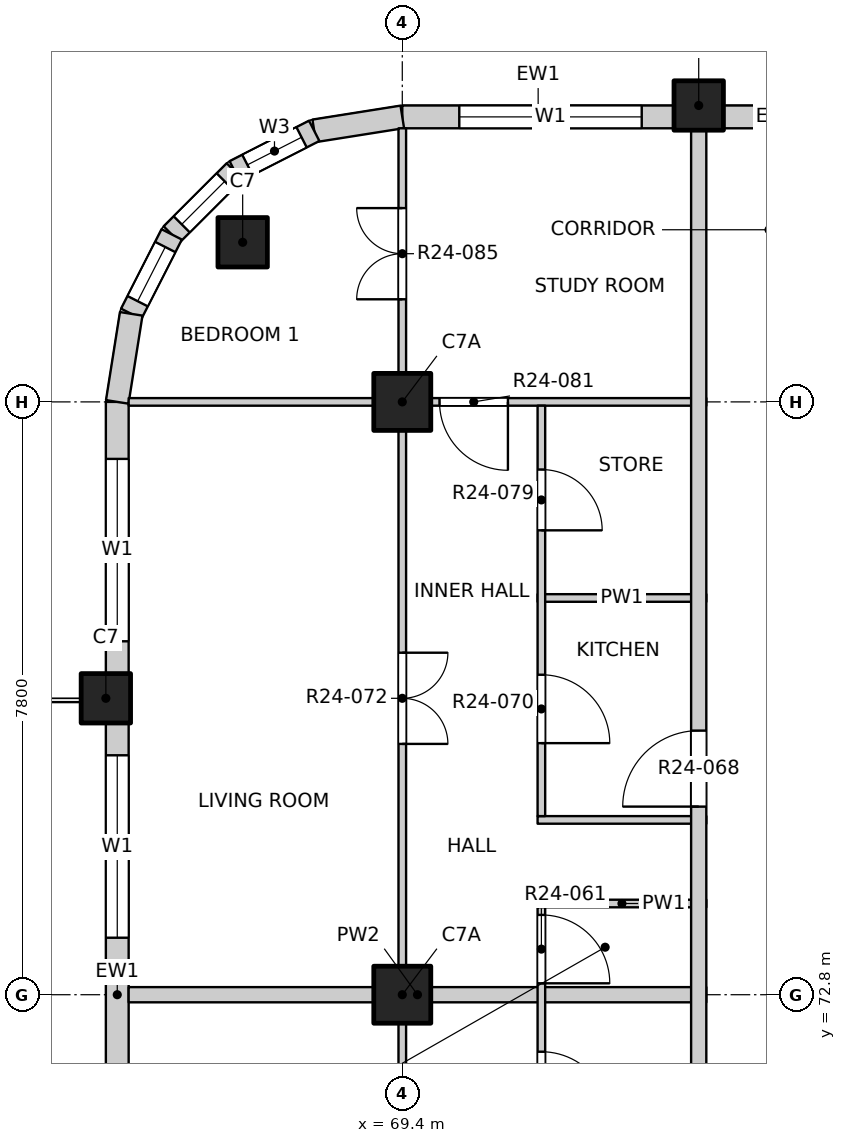
"""IFC4 building model, lengths in metres.
Left out: names, types, materials, properties, quantities, classifications, styles, units other than length and angle.
Written with IfcOpenShell. Run it as: python <this file> out.ifc"""

import sys

from ifc_helpers import new_model, si_unit, direction, frame, frame_2d, origin, origin_2d, place, context, subcontext, project, spatial, rectangle, extrude, element, fill, save


model = new_model("IFC4")
c1 = context("Model", 3, precision=1e-05, world=origin(), true_north=direction((0.0, 1.0)))
c2 = subcontext(c1, "Body", "Model", "MODEL_VIEW")
j1 = project(units=[si_unit("LENGTHUNIT", "METRE"), si_unit("PLANEANGLEUNIT", "RADIAN")], contexts=[c1])
p1 = place(None, origin())
s1 = spatial("IfcSite", under=j1, at=p1, CompositionType="ELEMENT")
p2 = place(p1, origin())
s2 = spatial("IfcBuilding", under=s1, at=p2, CompositionType="ELEMENT")
p3 = place(p2, frame((0.0, 0.0, 246.0)))
s3 = spatial("IfcBuildingStorey", under=s2, at=p3, CompositionType="ELEMENT", Elevation=246.0)
for number, where, z_axis, x_axis in (
    (1, (67.3, 82.7, -0.3), (0.0, 0.0, 1.0), (1.0, 0.0, 0.0)),
    (2, (73.3, 84.5, -0.3), (0.0, 0.0, 1.0), (1.0, 0.0, 0.0)),
    (3, (65.5, 76.7, -0.3), (0.0, 0.0, 1.0), (1.0, 0.0, 0.0)),
):
    element("IfcColumn", number, at=place(p3, frame(where, z_axis=z_axis, x_axis=x_axis)), inside=s3, PredefinedType="COLUMN", context=c2, shape_type="SweptSolid", body=[
        extrude(rectangle(XDim=0.65, YDim=0.65, at=origin_2d()), origin(), (0.0, 0.0, 1.0), 3.45),
    ])
for number, where, z_axis, x_axis in (
    (4, (69.4, 72.8, -0.3), (0.0, 0.0, 1.0), (1.0, 0.0, 0.0)),
    (5, (69.4, 80.6, -0.3), (0.0, 0.0, 1.0), (1.0, 0.0, 0.0)),
):
    element("IfcColumn", number, at=place(p3, frame(where, z_axis=z_axis, x_axis=x_axis)), inside=s3, PredefinedType="COLUMN", context=c2, shape_type="SweptSolid", body=[
        extrude(rectangle(XDim=0.75, YDim=0.75, at=origin_2d()), origin(), (0.0, 0.0, 1.0), 3.45),
    ])
p4 = place(p3, frame((69.4, 84.35, 0.0), z_axis=(0.0, 0.0, 1.0), x_axis=(1.0, 0.0, 0.0)))
e6 = element("IfcWall", 6, at=p4, inside=s3, PredefinedType="SOLIDWALL", context=c2, shape_type="SweptSolid", body=[
    extrude(rectangle(XDim=3.575, YDim=0.3, at=frame_2d((1.788, 0.0))), origin(), (0.0, 0.0, 1.0), 2.7),
])
p5 = place(p4, frame((0.75, 0.0, 0.9)))
e7 = element("IfcOpeningElement", 7, at=p5, cuts=e6, PredefinedType="OPENING", context=c2, shape_type="SweptSolid", body=[
    extrude(rectangle(XDim=2.4, YDim=1.8, at=frame_2d((1.2, 0.9))), frame((0.0, 0.16, 0.0), z_axis=(0.0, -1.0, 0.0), x_axis=(1.0, 0.0, 0.0)), (0.0, 0.0, 1.0), 0.32),
])
p6 = place(p3, frame((73.625, 84.35, 0.0), z_axis=(0.0, 0.0, 1.0), x_axis=(1.0, 0.0, 0.0)))
e8 = element("IfcWall", 8, at=p6, inside=s3, PredefinedType="SOLIDWALL", context=c2, shape_type="SweptSolid", body=[
    extrude(rectangle(XDim=1.425, YDim=0.3, at=frame_2d((0.712, 0.0))), origin(), (0.0, 0.0, 1.0), 2.7),
])
p7 = place(p3, frame((65.65, 69.225, 0.0), z_axis=(0.0, 0.0, 1.0), x_axis=(0.0, 1.0, 0.0)))
e9 = element("IfcWall", 9, at=p7, inside=s3, PredefinedType="SOLIDWALL", context=c2, shape_type="SweptSolid", body=[
    extrude(rectangle(XDim=7.15, YDim=0.3, at=frame_2d((3.575, 0.0))), origin(), (0.0, 0.0, 1.0), 2.7),
])
p8 = place(p7, frame((0.725, 0.0, 0.0)))
e10 = element("IfcOpeningElement", 10, at=p8, cuts=e9, PredefinedType="OPENING", context=c2, shape_type="SweptSolid", body=[
    extrude(rectangle(XDim=1.8, YDim=2.4, at=frame_2d((0.9, 1.2))), frame((0.0, 0.16, 0.0), z_axis=(0.0, -1.0, 0.0), x_axis=(1.0, 0.0, 0.0)), (0.0, 0.0, 1.0), 0.32),
])
p9 = place(p7, frame((4.325, 0.0, 0.9)))
e11 = element("IfcOpeningElement", 11, at=p9, cuts=e9, PredefinedType="OPENING", context=c2, shape_type="SweptSolid", body=[
    extrude(rectangle(XDim=2.4, YDim=1.8, at=frame_2d((1.2, 0.9))), frame((0.0, 0.16, 0.0), z_axis=(0.0, -1.0, 0.0), x_axis=(1.0, 0.0, 0.0)), (0.0, 0.0, 1.0), 0.32),
])
p10 = place(p3, frame((65.65, 77.025, 0.0), z_axis=(0.0, 0.0, 1.0), x_axis=(0.0, 1.0, 0.0)))
e12 = element("IfcWall", 12, at=p10, inside=s3, PredefinedType="SOLIDWALL", context=c2, shape_type="SweptSolid", body=[
    extrude(rectangle(XDim=3.575, YDim=0.3, at=frame_2d((1.788, 0.0))), origin(), (0.0, 0.0, 1.0), 2.7),
])
p11 = place(p10, frame((0.425, 0.0, 0.9)))
e13 = element("IfcOpeningElement", 13, at=p11, cuts=e12, PredefinedType="OPENING", context=c2, shape_type="SweptSolid", body=[
    extrude(rectangle(XDim=2.4, YDim=1.8, at=frame_2d((1.2, 0.9))), frame((0.0, 0.16, 0.0), z_axis=(0.0, -1.0, 0.0), x_axis=(1.0, 0.0, 0.0)), (0.0, 0.0, 1.0), 0.32),
])
p12 = place(p3, frame((69.4, 84.35, 0.0), z_axis=(0.0, 0.0, 1.0), x_axis=(-0.987678452879, -0.156496880861, 0.0)))
e14 = element("IfcWall", 14, at=p12, inside=s3, PredefinedType="SOLIDWALL", context=c2, shape_type="SweptSolid", body=[
    extrude(rectangle(XDim=1.173, YDim=0.3, at=frame_2d((0.586, 0.0))), origin(), (0.0, 0.0, 1.0), 2.7),
])
p13 = place(p3, frame((68.241, 84.167, 0.0), z_axis=(0.0, 0.0, 1.0), x_axis=(-0.890988677504, -0.454025524128, 0.0)))
e15 = element("IfcWall", 15, at=p13, inside=s3, PredefinedType="SOLIDWALL", context=c2, shape_type="SweptSolid", body=[
    extrude(rectangle(XDim=1.173, YDim=0.3, at=frame_2d((0.587, 0.0))), origin(), (0.0, 0.0, 1.0), 2.7),
])
p14 = place(p13, frame((0.187, 0.0, 0.9)))
e16 = element("IfcOpeningElement", 16, at=p14, cuts=e15, PredefinedType="OPENING", context=c2, shape_type="SweptSolid", body=[
    extrude(rectangle(XDim=0.8, YDim=1.2, at=frame_2d((0.4, 0.6))), frame((0.0, 0.16, 0.0), z_axis=(0.0, -1.0, 0.0), x_axis=(1.0, 0.0, 0.0)), (0.0, 0.0, 1.0), 0.32),
])
p15 = place(p3, frame((67.196, 83.634, 0.0), z_axis=(0.0, 0.0, 1.0), x_axis=(-0.707106781187, -0.707106781187, 0.0)))
e17 = element("IfcWall", 17, at=p15, inside=s3, PredefinedType="SOLIDWALL", context=c2, shape_type="SweptSolid", body=[
    extrude(rectangle(XDim=1.173, YDim=0.3, at=frame_2d((0.586, 0.0))), origin(), (0.0, 0.0, 1.0), 2.7),
])
p16 = place(p15, frame((0.187, 0.0, 0.9)))
e18 = element("IfcOpeningElement", 18, at=p16, cuts=e17, PredefinedType="OPENING", context=c2, shape_type="SweptSolid", body=[
    extrude(rectangle(XDim=0.8, YDim=1.2, at=frame_2d((0.4, 0.6))), frame((0.0, 0.16, 0.0), z_axis=(0.0, -1.0, 0.0), x_axis=(1.0, 0.0, 0.0)), (0.0, 0.0, 1.0), 0.32),
])
p17 = place(p3, frame((66.366, 82.804, 0.0), z_axis=(0.0, 0.0, 1.0), x_axis=(-0.454025524128, -0.890988677504, 0.0)))
e19 = element("IfcWall", 19, at=p17, inside=s3, PredefinedType="SOLIDWALL", context=c2, shape_type="SweptSolid", body=[
    extrude(rectangle(XDim=1.173, YDim=0.3, at=frame_2d((0.587, 0.0))), origin(), (0.0, 0.0, 1.0), 2.7),
])
p18 = place(p17, frame((0.187, 0.0, 0.9)))
e20 = element("IfcOpeningElement", 20, at=p18, cuts=e19, PredefinedType="OPENING", context=c2, shape_type="SweptSolid", body=[
    extrude(rectangle(XDim=0.8, YDim=1.2, at=frame_2d((0.4, 0.6))), frame((0.0, 0.16, 0.0), z_axis=(0.0, -1.0, 0.0), x_axis=(1.0, 0.0, 0.0)), (0.0, 0.0, 1.0), 0.32),
])
p19 = place(p3, frame((65.833, 81.759, 0.0), z_axis=(0.0, 0.0, 1.0), x_axis=(-0.156496880861, -0.987678452879, 0.0)))
e21 = element("IfcWall", 21, at=p19, inside=s3, PredefinedType="SOLIDWALL", context=c2, shape_type="SweptSolid", body=[
    extrude(rectangle(XDim=1.173, YDim=0.3, at=frame_2d((0.586, 0.0))), origin(), (0.0, 0.0, 1.0), 2.7),
])
p20 = place(p3, frame((65.8, 72.8, 0.0), z_axis=(0.0, 0.0, 1.0), x_axis=(1.0, 0.0, 0.0)))
e22 = element("IfcWall", 22, at=p20, inside=s3, PredefinedType="PARTITIONING", context=c2, shape_type="SweptSolid", body=[
    extrude(rectangle(XDim=7.6, YDim=0.2, at=frame_2d((3.8, 0.0))), origin(), (0.0, 0.0, 1.0), 3.15),
])
for number, where, z_axis, x_axis in (
    (23, (71.18, 74.0, 0.0), (0.0, 0.0, 1.0), (1.0, 0.0, 0.0)),
    (24, (71.18, 75.1, 0.0), (0.0, 0.0, 1.0), (1.0, 0.0, 0.0)),
    (25, (71.18, 78.02, 0.0), (0.0, 0.0, 1.0), (1.0, 0.0, 0.0)),
):
    element("IfcWall", number, at=place(p3, frame(where, z_axis=z_axis, x_axis=x_axis)), inside=s3, PredefinedType="PARTITIONING", context=c2, shape_type="SweptSolid", body=[
        extrude(rectangle(XDim=2.22, YDim=0.1, at=frame_2d((1.11, 0.0))), origin(), (0.0, 0.0, 1.0), 3.15),
    ])
p21 = place(p3, frame((65.8, 80.6, 0.0), z_axis=(0.0, 0.0, 1.0), x_axis=(1.0, 0.0, 0.0)))
e26 = element("IfcWall", 26, at=p21, inside=s3, PredefinedType="PARTITIONING", context=c2, shape_type="SweptSolid", body=[
    extrude(rectangle(XDim=7.6, YDim=0.1, at=frame_2d((3.8, 0.0))), origin(), (0.0, 0.0, 1.0), 3.15),
])
p22 = place(p21, frame((4.09, 0.0, 0.0)))
e27 = element("IfcOpeningElement", 27, at=p22, cuts=e26, PredefinedType="OPENING", context=c2, shape_type="SweptSolid", body=[
    extrude(rectangle(XDim=0.9, YDim=2.1, at=frame_2d((0.45, 1.05))), frame((0.0, 0.06, 0.0), z_axis=(0.0, -1.0, 0.0), x_axis=(1.0, 0.0, 0.0)), (0.0, 0.0, 1.0), 0.12),
])
p23 = place(p3, frame((69.4, 45.8, 0.0), z_axis=(0.0, 0.0, 1.0), x_axis=(0.0, 1.0, 0.0)))
e28 = element("IfcWall", 28, at=p23, inside=s3, PredefinedType="PARTITIONING", context=c2, shape_type="SweptSolid", body=[
    extrude(rectangle(XDim=38.4, YDim=0.1, at=frame_2d((19.2, 0.0))), origin(), (0.0, 0.0, 1.0), 3.15),
])
p24 = place(p23, frame((1.05, 0.0, 0.0)))
e29 = element("IfcOpeningElement", 29, at=p24, cuts=e28, PredefinedType="OPENING", context=c2, shape_type="SweptSolid", body=[
    extrude(rectangle(XDim=1.2, YDim=2.1, at=frame_2d((0.6, 1.05))), frame((0.0, 0.06, 0.0), z_axis=(0.0, -1.0, 0.0), x_axis=(1.0, 0.0, 0.0)), (0.0, 0.0, 1.0), 0.12),
])
p25 = place(p23, frame((5.1, 0.0, 0.0)))
e30 = element("IfcOpeningElement", 30, at=p25, cuts=e28, PredefinedType="OPENING", context=c2, shape_type="SweptSolid", body=[
    extrude(rectangle(XDim=0.9, YDim=2.1, at=frame_2d((0.45, 1.05))), frame((0.0, 0.06, 0.0), z_axis=(0.0, -1.0, 0.0), x_axis=(1.0, 0.0, 0.0)), (0.0, 0.0, 1.0), 0.12),
])
p26 = place(p23, frame((9.0, 0.0, 0.0)))
e31 = element("IfcOpeningElement", 31, at=p26, cuts=e28, PredefinedType="OPENING", context=c2, shape_type="SweptSolid", body=[
    extrude(rectangle(XDim=0.9, YDim=2.1, at=frame_2d((0.45, 1.05))), frame((0.0, 0.06, 0.0), z_axis=(0.0, -1.0, 0.0), x_axis=(1.0, 0.0, 0.0)), (0.0, 0.0, 1.0), 0.12),
])
p27 = place(p23, frame((12.9, 0.0, 0.0)))
e32 = element("IfcOpeningElement", 32, at=p27, cuts=e28, PredefinedType="OPENING", context=c2, shape_type="SweptSolid", body=[
    extrude(rectangle(XDim=0.9, YDim=2.1, at=frame_2d((0.45, 1.05))), frame((0.0, 0.06, 0.0), z_axis=(0.0, -1.0, 0.0), x_axis=(1.0, 0.0, 0.0)), (0.0, 0.0, 1.0), 0.12),
])
p28 = place(p23, frame((16.8, 0.0, 0.0)))
e33 = element("IfcOpeningElement", 33, at=p28, cuts=e28, PredefinedType="OPENING", context=c2, shape_type="SweptSolid", body=[
    extrude(rectangle(XDim=0.9, YDim=2.1, at=frame_2d((0.45, 1.05))), frame((0.0, 0.06, 0.0), z_axis=(0.0, -1.0, 0.0), x_axis=(1.0, 0.0, 0.0)), (0.0, 0.0, 1.0), 0.12),
])
p29 = place(p23, frame((20.7, 0.0, 0.0)))
e34 = element("IfcOpeningElement", 34, at=p29, cuts=e28, PredefinedType="OPENING", context=c2, shape_type="SweptSolid", body=[
    extrude(rectangle(XDim=0.9, YDim=2.1, at=frame_2d((0.45, 1.05))), frame((0.0, 0.06, 0.0), z_axis=(0.0, -1.0, 0.0), x_axis=(1.0, 0.0, 0.0)), (0.0, 0.0, 1.0), 0.12),
])
p30 = place(p23, frame((24.6, 0.0, 0.0)))
e35 = element("IfcOpeningElement", 35, at=p30, cuts=e28, PredefinedType="OPENING", context=c2, shape_type="SweptSolid", body=[
    extrude(rectangle(XDim=0.9, YDim=2.1, at=frame_2d((0.45, 1.05))), frame((0.0, 0.06, 0.0), z_axis=(0.0, -1.0, 0.0), x_axis=(1.0, 0.0, 0.0)), (0.0, 0.0, 1.0), 0.12),
])
p31 = place(p23, frame((30.3, 0.0, 0.0)))
e36 = element("IfcOpeningElement", 36, at=p31, cuts=e28, PredefinedType="OPENING", context=c2, shape_type="SweptSolid", body=[
    extrude(rectangle(XDim=1.2, YDim=2.1, at=frame_2d((0.6, 1.05))), frame((0.0, 0.06, 0.0), z_axis=(0.0, -1.0, 0.0), x_axis=(1.0, 0.0, 0.0)), (0.0, 0.0, 1.0), 0.12),
])
p32 = place(p23, frame((36.15, 0.0, 0.0)))
e37 = element("IfcOpeningElement", 37, at=p32, cuts=e28, PredefinedType="OPENING", context=c2, shape_type="SweptSolid", body=[
    extrude(rectangle(XDim=1.2, YDim=2.1, at=frame_2d((0.6, 1.05))), frame((0.0, 0.06, 0.0), z_axis=(0.0, -1.0, 0.0), x_axis=(1.0, 0.0, 0.0)), (0.0, 0.0, 1.0), 0.12),
])
p33 = place(p3, frame((71.23, 67.25, 0.0), z_axis=(0.0, 0.0, 1.0), x_axis=(0.0, 1.0, 0.0)))
e38 = element("IfcWall", 38, at=p33, inside=s3, PredefinedType="PARTITIONING", context=c2, shape_type="SweptSolid", body=[
    extrude(rectangle(XDim=6.7, YDim=0.1, at=frame_2d((3.35, 0.0))), origin(), (0.0, 0.0, 1.0), 3.15),
])
p34 = place(p33, frame((1.1, 0.0, 0.0)))
e39 = element("IfcOpeningElement", 39, at=p34, cuts=e38, PredefinedType="OPENING", context=c2, shape_type="SweptSolid", body=[
    extrude(rectangle(XDim=0.9, YDim=2.1, at=frame_2d((0.45, 1.05))), frame((0.0, 0.06, 0.0), z_axis=(0.0, -1.0, 0.0), x_axis=(1.0, 0.0, 0.0)), (0.0, 0.0, 1.0), 0.12),
])
p35 = place(p33, frame((3.9, 0.0, 0.0)))
e40 = element("IfcOpeningElement", 40, at=p35, cuts=e38, PredefinedType="OPENING", context=c2, shape_type="SweptSolid", body=[
    extrude(rectangle(XDim=0.9, YDim=2.1, at=frame_2d((0.45, 1.05))), frame((0.0, 0.06, 0.0), z_axis=(0.0, -1.0, 0.0), x_axis=(1.0, 0.0, 0.0)), (0.0, 0.0, 1.0), 0.12),
])
p36 = place(p33, frame((5.7, 0.0, 0.0)))
e41 = element("IfcOpeningElement", 41, at=p36, cuts=e38, PredefinedType="OPENING", context=c2, shape_type="SweptSolid", body=[
    extrude(rectangle(XDim=0.9, YDim=2.1, at=frame_2d((0.45, 1.05))), frame((0.0, 0.06, 0.0), z_axis=(0.0, -1.0, 0.0), x_axis=(1.0, 0.0, 0.0)), (0.0, 0.0, 1.0), 0.12),
])
p37 = place(p3, frame((71.23, 75.15, 0.0), z_axis=(0.0, 0.0, 1.0), x_axis=(0.0, 1.0, 0.0)))
e42 = element("IfcWall", 42, at=p37, inside=s3, PredefinedType="PARTITIONING", context=c2, shape_type="SweptSolid", body=[
    extrude(rectangle(XDim=5.4, YDim=0.1, at=frame_2d((2.7, 0.0))), origin(), (0.0, 0.0, 1.0), 3.15),
])
p38 = place(p37, frame((0.96, 0.0, 0.0)))
e43 = element("IfcOpeningElement", 43, at=p38, cuts=e42, PredefinedType="OPENING", context=c2, shape_type="SweptSolid", body=[
    extrude(rectangle(XDim=0.9, YDim=2.1, at=frame_2d((0.45, 1.05))), frame((0.0, 0.06, 0.0), z_axis=(0.0, -1.0, 0.0), x_axis=(1.0, 0.0, 0.0)), (0.0, 0.0, 1.0), 0.12),
])
p39 = place(p37, frame((3.76, 0.0, 0.0)))
e44 = element("IfcOpeningElement", 44, at=p39, cuts=e42, PredefinedType="OPENING", context=c2, shape_type="SweptSolid", body=[
    extrude(rectangle(XDim=0.8, YDim=2.1, at=frame_2d((0.4, 1.05))), frame((0.0, 0.06, 0.0), z_axis=(0.0, -1.0, 0.0), x_axis=(1.0, 0.0, 0.0)), (0.0, 0.0, 1.0), 0.12),
])
p40 = place(p3, frame((73.3, 49.5, 0.0), z_axis=(0.0, 0.0, 1.0), x_axis=(0.0, 1.0, 0.0)))
e45 = element("IfcWall", 45, at=p40, inside=s3, PredefinedType="PARTITIONING", context=c2, shape_type="SweptSolid", body=[
    extrude(rectangle(XDim=34.7, YDim=0.2, at=frame_2d((17.35, 0.0))), origin(), (0.0, 0.0, 1.0), 3.15),
])
p41 = place(p40, frame((3.325, 0.0, 0.0)))
e46 = element("IfcOpeningElement", 46, at=p41, cuts=e45, PredefinedType="OPENING", context=c2, shape_type="SweptSolid", body=[
    extrude(rectangle(XDim=1.0, YDim=2.1, at=frame_2d((0.5, 1.05))), frame((0.0, 0.11, 0.0), z_axis=(0.0, -1.0, 0.0), x_axis=(1.0, 0.0, 0.0)), (0.0, 0.0, 1.0), 0.22),
])
p42 = place(p40, frame((17.875, 0.0, 0.0)))
e47 = element("IfcOpeningElement", 47, at=p42, cuts=e45, PredefinedType="OPENING", context=c2, shape_type="SweptSolid", body=[
    extrude(rectangle(XDim=1.0, YDim=2.1, at=frame_2d((0.5, 1.05))), frame((0.0, 0.11, 0.0), z_axis=(0.0, -1.0, 0.0), x_axis=(1.0, 0.0, 0.0)), (0.0, 0.0, 1.0), 0.22),
])
p43 = place(p40, frame((25.775, 0.0, 0.0)))
e48 = element("IfcOpeningElement", 48, at=p43, cuts=e45, PredefinedType="OPENING", context=c2, shape_type="SweptSolid", body=[
    extrude(rectangle(XDim=1.0, YDim=2.1, at=frame_2d((0.5, 1.05))), frame((0.0, 0.11, 0.0), z_axis=(0.0, -1.0, 0.0), x_axis=(1.0, 0.0, 0.0)), (0.0, 0.0, 1.0), 0.22),
])
p44 = place(p5, origin())
e49 = element("IfcWindow", 49, at=p44, inside=s3, PartitioningType="DOUBLE_PANEL_VERTICAL", PredefinedType="WINDOW", context=c2, shape_type="SweptSolid", body=[
    extrude(rectangle(XDim=2.4, YDim=1.8, at=frame_2d((1.2, 0.9))), frame((0.0, 0.03, 0.0), z_axis=(0.0, -1.0, 0.0), x_axis=(1.0, 0.0, 0.0)), (0.0, 0.0, 1.0), 0.06),
])
fill(e7, e49)
p45 = place(p9, origin())
e50 = element("IfcWindow", 50, at=p45, inside=s3, PartitioningType="DOUBLE_PANEL_VERTICAL", PredefinedType="WINDOW", context=c2, shape_type="SweptSolid", body=[
    extrude(rectangle(XDim=2.4, YDim=1.8, at=frame_2d((1.2, 0.9))), frame((0.0, 0.03, 0.0), z_axis=(0.0, -1.0, 0.0), x_axis=(1.0, 0.0, 0.0)), (0.0, 0.0, 1.0), 0.06),
])
fill(e11, e50)
p46 = place(p11, origin())
e51 = element("IfcWindow", 51, at=p46, inside=s3, PartitioningType="DOUBLE_PANEL_VERTICAL", PredefinedType="WINDOW", context=c2, shape_type="SweptSolid", body=[
    extrude(rectangle(XDim=2.4, YDim=1.8, at=frame_2d((1.2, 0.9))), frame((0.0, 0.03, 0.0), z_axis=(0.0, -1.0, 0.0), x_axis=(1.0, 0.0, 0.0)), (0.0, 0.0, 1.0), 0.06),
])
fill(e13, e51)
p47 = place(p14, origin())
e52 = element("IfcWindow", 52, at=p47, inside=s3, PartitioningType="SINGLE_PANEL", PredefinedType="WINDOW", context=c2, shape_type="SweptSolid", body=[
    extrude(rectangle(XDim=0.8, YDim=1.2, at=frame_2d((0.4, 0.6))), frame((0.0, 0.03, 0.0), z_axis=(0.0, -1.0, 0.0), x_axis=(1.0, 0.0, 0.0)), (0.0, 0.0, 1.0), 0.06),
])
fill(e16, e52)
p48 = place(p16, origin())
e53 = element("IfcWindow", 53, at=p48, inside=s3, PartitioningType="SINGLE_PANEL", PredefinedType="WINDOW", context=c2, shape_type="SweptSolid", body=[
    extrude(rectangle(XDim=0.8, YDim=1.2, at=frame_2d((0.4, 0.6))), frame((0.0, 0.03, 0.0), z_axis=(0.0, -1.0, 0.0), x_axis=(1.0, 0.0, 0.0)), (0.0, 0.0, 1.0), 0.06),
])
fill(e18, e53)
p49 = place(p18, origin())
e54 = element("IfcWindow", 54, at=p49, inside=s3, PartitioningType="SINGLE_PANEL", PredefinedType="WINDOW", context=c2, shape_type="SweptSolid", body=[
    extrude(rectangle(XDim=0.8, YDim=1.2, at=frame_2d((0.4, 0.6))), frame((0.0, 0.03, 0.0), z_axis=(0.0, -1.0, 0.0), x_axis=(1.0, 0.0, 0.0)), (0.0, 0.0, 1.0), 0.06),
])
fill(e20, e54)
p50 = place(p35, origin())
e55 = element("IfcDoor", 55, at=p50, inside=s3, OperationType="SINGLE_SWING_RIGHT", PredefinedType="DOOR", context=c2, shape_type="SweptSolid", body=[
    extrude(rectangle(XDim=0.9, YDim=2.1, at=frame_2d((0.45, 1.05))), frame((0.0, 0.025, 0.0), z_axis=(0.0, -1.0, 0.0), x_axis=(1.0, 0.0, 0.0)), (0.0, 0.0, 1.0), 0.05),
])
fill(e40, e55)
p51 = place(p36, origin())
e56 = element("IfcDoor", 56, at=p51, inside=s3, OperationType="SINGLE_SWING_RIGHT", PredefinedType="DOOR", context=c2, shape_type="SweptSolid", body=[
    extrude(rectangle(XDim=0.9, YDim=2.1, at=frame_2d((0.45, 1.05))), frame((0.0, 0.025, 0.0), z_axis=(0.0, -1.0, 0.0), x_axis=(1.0, 0.0, 0.0)), (0.0, 0.0, 1.0), 0.05),
])
fill(e41, e56)
p52 = place(p43, origin())
e57 = element("IfcDoor", 57, at=p52, inside=s3, OperationType="SINGLE_SWING_RIGHT", PredefinedType="DOOR", context=c2, shape_type="SweptSolid", body=[
    extrude(rectangle(XDim=1.0, YDim=2.1, at=frame_2d((0.5, 1.05))), frame((0.0, 0.025, 0.0), z_axis=(0.0, -1.0, 0.0), x_axis=(1.0, 0.0, 0.0)), (0.0, 0.0, 1.0), 0.05),
])
fill(e48, e57)
p53 = place(p38, origin())
e58 = element("IfcDoor", 58, at=p53, inside=s3, OperationType="SINGLE_SWING_RIGHT", PredefinedType="DOOR", context=c2, shape_type="SweptSolid", body=[
    extrude(rectangle(XDim=0.9, YDim=2.1, at=frame_2d((0.45, 1.05))), frame((0.0, 0.025, 0.0), z_axis=(0.0, -1.0, 0.0), x_axis=(1.0, 0.0, 0.0)), (0.0, 0.0, 1.0), 0.05),
])
fill(e43, e58)
p54 = place(p31, origin())
e59 = element("IfcDoor", 59, at=p54, inside=s3, OperationType="DOUBLE_DOOR_SINGLE_SWING", PredefinedType="DOOR", context=c2, shape_type="SweptSolid", body=[
    extrude(rectangle(XDim=1.2, YDim=2.1, at=frame_2d((0.6, 1.05))), frame((0.0, 0.025, 0.0), z_axis=(0.0, -1.0, 0.0), x_axis=(1.0, 0.0, 0.0)), (0.0, 0.0, 1.0), 0.05),
])
fill(e36, e59)
p55 = place(p39, origin())
e60 = element("IfcDoor", 60, at=p55, inside=s3, OperationType="SINGLE_SWING_RIGHT", PredefinedType="DOOR", context=c2, shape_type="SweptSolid", body=[
    extrude(rectangle(XDim=0.8, YDim=2.1, at=frame_2d((0.4, 1.05))), frame((0.0, 0.025, 0.0), z_axis=(0.0, -1.0, 0.0), x_axis=(1.0, 0.0, 0.0)), (0.0, 0.0, 1.0), 0.05),
])
fill(e44, e60)
p56 = place(p22, origin())
e61 = element("IfcDoor", 61, at=p56, inside=s3, OperationType="SINGLE_SWING_LEFT", PredefinedType="DOOR", context=c2, shape_type="SweptSolid", body=[
    extrude(rectangle(XDim=0.9, YDim=2.1, at=frame_2d((0.45, 1.05))), frame((0.0, 0.025, 0.0), z_axis=(0.0, -1.0, 0.0), x_axis=(1.0, 0.0, 0.0)), (0.0, 0.0, 1.0), 0.05),
])
fill(e27, e61)
p57 = place(p32, origin())
e62 = element("IfcDoor", 62, at=p57, inside=s3, OperationType="DOUBLE_DOOR_SINGLE_SWING", PredefinedType="DOOR", context=c2, shape_type="SweptSolid", body=[
    extrude(rectangle(XDim=1.2, YDim=2.1, at=frame_2d((0.6, 1.05))), frame((0.0, 0.025, 0.0), z_axis=(0.0, -1.0, 0.0), x_axis=(1.0, 0.0, 0.0)), (0.0, 0.0, 1.0), 0.05),
])
fill(e37, e62)
save(model, sys.argv[1])
